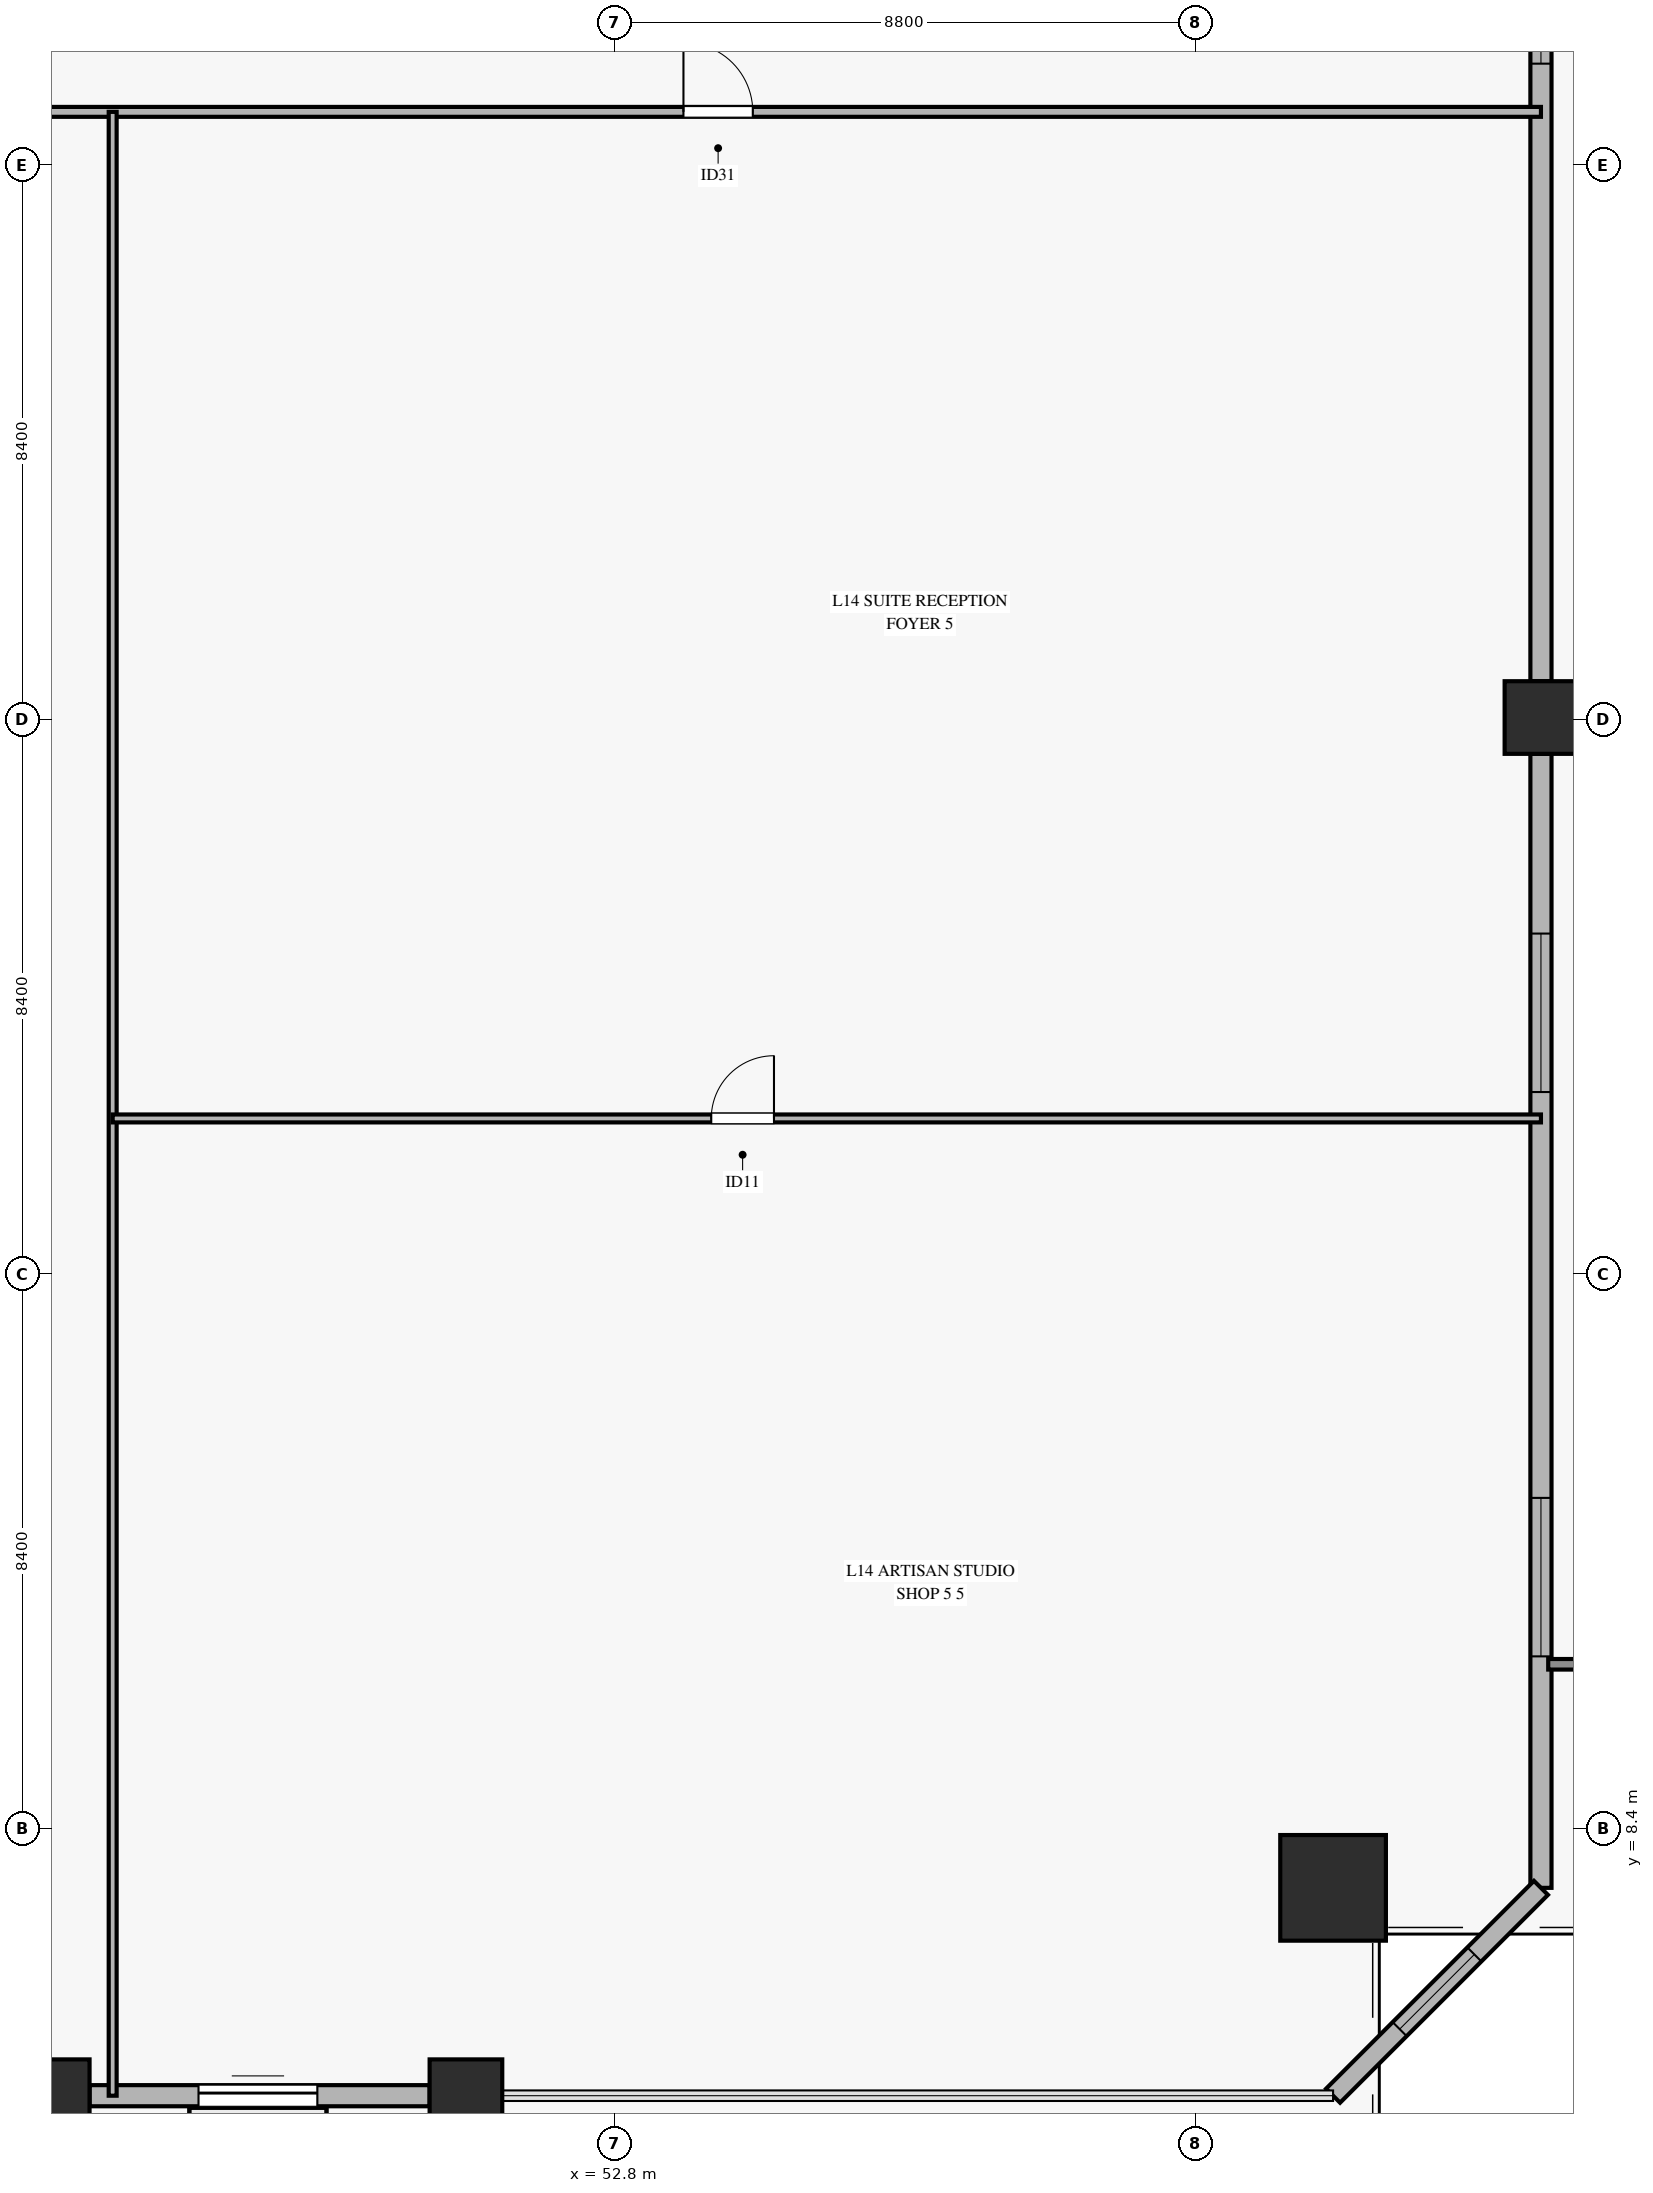
"""IFC4 building model, lengths in metres.
Left out: names, types, materials, properties, quantities, classifications, styles, units other than length and angle.
Written with IfcOpenShell. Run it as: python <this file> out.ifc"""

import sys

from ifc_helpers import new_model, si_unit, direction, frame, frame_2d, origin, origin_2d, place, context, subcontext, project, spatial, rectangle, hollow_rectangle, extrude, source, transform, mapped, element, fill, save


model = new_model("IFC4")
c1 = context("Model", 3, precision=1e-05, world=origin(), true_north=direction((0.0, 1.0)))
c2 = subcontext(c1, "Body", "Model", "MODEL_VIEW")
j1 = project(units=[si_unit("LENGTHUNIT", "METRE"), si_unit("PLANEANGLEUNIT", "RADIAN")], contexts=[c1])
p1 = place(None, origin())
s1 = spatial("IfcSite", under=j1, at=p1, CompositionType="ELEMENT")
p2 = place(p1, origin())
s2 = spatial("IfcBuilding", under=s1, at=p2, CompositionType="ELEMENT")
p3 = place(p2, frame((0.0, 0.0, 57.2)))
s3 = spatial("IfcBuildingStorey", under=s2, at=p3, CompositionType="ELEMENT", Elevation=57.2)
m1 = source(origin(), c2, "Body", "SweptSolid", [
    extrude(hollow_rectangle(XDim=1.6, YDim=1.6, WallThickness=0.075, at=origin_2d()), origin(), (0.0, 0.0, 1.0), 3.72),
])
p4 = place(p3, frame((63.682, 7.502, 0.0), z_axis=(-0.055853235293, 0.134940366349, 0.98927827917), x_axis=(-0.923978502811, -0.382444409481, 0.0)))
e1 = element("IfcColumn", 1, at=p4, inside=s3, PredefinedType="COLUMN", context=c2, shape_type="MappedRepresentation", body=[
    mapped(m1, transform((0.0, 0.0, 0.0), x_axis=(1.0, 0.0, 0.0), y_axis=(0.0, 1.0, 0.0), z_axis=(0.0, 0.0, 1.0), scale=1.0)),
])
m2 = source(origin(), c2, "Body", "SweptSolid", [
    extrude(hollow_rectangle(XDim=1.1, YDim=1.1, WallThickness=0.05, at=origin_2d()), origin(), (0.0, 0.0, 1.0), 3.718),
])
for number, where, z_axis, x_axis in (
    (2, (44.3, 4.354, 0.0), (0.0, 0.142, 0.99), (-1.0, 0.0, 0.0)),
    (3, (50.55, 4.354, 0.0), (0.0, 0.142, 0.99), (-1.0, 0.0, 0.0)),
):
    element("IfcColumn", number, at=place(p3, frame(where, z_axis=z_axis, x_axis=x_axis)), inside=s3, PredefinedType="COLUMN", context=c2, shape_type="MappedRepresentation", body=[
        mapped(m2, transform((0.0, 0.0, 0.0), x_axis=(1.0, 0.0, 0.0), y_axis=(0.0, 1.0, 0.0), z_axis=(0.0, 0.0, 1.0), scale=1.0)),
    ])
m3 = source(origin(), c2, "Body", "SweptSolid", [
    extrude(hollow_rectangle(XDim=1.1, YDim=1.1, WallThickness=0.05, at=origin_2d()), origin(), (0.0, 0.0, 1.0), 3.697),
])
p5 = place(p3, frame((66.83, 25.227, 0.0), z_axis=(-0.063333303059, 0.071390303031, 0.995435742455), x_axis=(-0.7480580155, -0.6636333366, 0.0)))
e4 = element("IfcColumn", 4, at=p5, inside=s3, PredefinedType="COLUMN", context=c2, shape_type="MappedRepresentation", body=[
    mapped(m3, transform((0.0, 0.0, 0.0), x_axis=(1.0, 0.0, 0.0), y_axis=(0.0, 1.0, 0.0), z_axis=(0.0, 0.0, 1.0), scale=1.0)),
])
p6 = place(p3, frame((44.85, 4.354, 0.0), z_axis=(0.0, 0.0, 1.0), x_axis=(1.0, 0.0, 0.0)))
e5 = element("IfcWall", 5, at=p6, inside=s3, PredefinedType="SOLIDWALL", context=c2, shape_type="SweptSolid", body=[
    extrude(rectangle(XDim=5.15, YDim=0.32, at=frame_2d((2.575, 0.0))), origin(), (0.0, 0.0, 1.0), 3.16),
])
p7 = place(p6, frame((1.65, 0.0, 0.0)))
e6 = element("IfcOpeningElement", 6, at=p7, cuts=e5, PredefinedType="OPENING", context=c2, shape_type="SweptSolid", body=[
    extrude(rectangle(XDim=1.8, YDim=2.25, at=frame_2d((0.9, 1.125))), frame((0.0, 0.17, 0.0), z_axis=(0.0, -1.0, 0.0), x_axis=(1.0, 0.0, 0.0)), (0.0, 0.0, 1.0), 0.34),
])
p8 = place(p3, frame((66.83, 7.502, 0.0), z_axis=(0.0, 0.0, 1.0), x_axis=(0.0, 1.0, 0.0)))
e7 = element("IfcWall", 7, at=p8, inside=s3, PredefinedType="SOLIDWALL", context=c2, shape_type="SweptSolid", body=[
    extrude(rectangle(XDim=17.175, YDim=0.32, at=frame_2d((8.587, 0.0))), origin(), (0.0, 0.0, 1.0), 3.16),
])
p9 = place(p8, frame((3.506, 0.0, 0.45)))
e8 = element("IfcOpeningElement", 8, at=p9, cuts=e7, PredefinedType="OPENING", context=c2, shape_type="SweptSolid", body=[
    extrude(rectangle(XDim=2.4, YDim=2.1, at=frame_2d((1.2, 1.05))), frame((0.0, 0.17, 0.0), z_axis=(0.0, -1.0, 0.0), x_axis=(1.0, 0.0, 0.0)), (0.0, 0.0, 1.0), 0.34),
])
p10 = place(p8, frame((12.053, 0.0, 0.45)))
e9 = element("IfcOpeningElement", 9, at=p10, cuts=e7, PredefinedType="OPENING", context=c2, shape_type="SweptSolid", body=[
    extrude(rectangle(XDim=2.4, YDim=2.1, at=frame_2d((1.2, 1.05))), frame((0.0, 0.17, 0.0), z_axis=(0.0, -1.0, 0.0), x_axis=(1.0, 0.0, 0.0)), (0.0, 0.0, 1.0), 0.34),
])
p11 = place(p3, frame((66.83, 25.777, 0.0), z_axis=(0.0, 0.0, 1.0), x_axis=(0.0, 1.0, 0.0)))
e10 = element("IfcWall", 10, at=p11, inside=s3, PredefinedType="SOLIDWALL", context=c2, shape_type="SweptSolid", body=[
    extrude(rectangle(XDim=17.175, YDim=0.32, at=frame_2d((8.587, 0.0))), origin(), (0.0, 0.0, 1.0), 3.16),
])
p12 = place(p11, frame((9.353, 0.0, 0.45)))
e11 = element("IfcOpeningElement", 11, at=p12, cuts=e10, PredefinedType="OPENING", context=c2, shape_type="SweptSolid", body=[
    extrude(rectangle(XDim=1.6, YDim=2.0, at=frame_2d((0.8, 1.0))), frame((0.0, 0.17, 0.0), z_axis=(0.0, -1.0, 0.0), x_axis=(1.0, 0.0, 0.0)), (0.0, 0.0, 1.0), 0.34),
])
p13 = place(p3, frame((63.682, 4.354, 0.0), z_axis=(0.0, 0.0, 1.0), x_axis=(0.707134199585, 0.707079361725, 0.0)))
e12 = element("IfcWall", 12, at=p13, inside=s3, PredefinedType="SOLIDWALL", context=c2, shape_type="SweptSolid", body=[
    extrude(rectangle(XDim=4.452, YDim=0.3, at=frame_2d((2.226, 0.0))), origin(), (0.0, 0.0, 1.0), 3.16),
])
p14 = place(p13, frame((1.426, 0.0, 0.45)))
e13 = element("IfcOpeningElement", 13, at=p14, cuts=e12, PredefinedType="OPENING", context=c2, shape_type="SweptSolid", body=[
    extrude(rectangle(XDim=1.6, YDim=2.0, at=frame_2d((0.8, 1.0))), frame((0.0, 0.16, 0.0), z_axis=(0.0, -1.0, 0.0), x_axis=(1.0, 0.0, 0.0)), (0.0, 0.0, 1.0), 0.32),
])
p15 = place(p3, frame((3.57, 34.4, 0.0), z_axis=(0.0, 0.0, 1.0), x_axis=(1.0, 0.0, 0.0)))
e14 = element("IfcWall", 14, at=p15, inside=s3, PredefinedType="PARTITIONING", context=c2, shape_type="SweptSolid", body=[
    extrude(rectangle(XDim=63.26, YDim=0.15, at=frame_2d((31.63, 0.0))), origin(), (0.0, 0.0, 1.0), 2.765),
])
p16 = place(p15, frame((7.799, 0.0, 0.0)))
e15 = element("IfcOpeningElement", 15, at=p16, cuts=e14, PredefinedType="OPENING", context=c2, shape_type="SweptSolid", body=[
    extrude(rectangle(XDim=1.05, YDim=2.15, at=frame_2d((0.525, 1.075))), frame((0.0, 0.085, 0.0), z_axis=(0.0, -1.0, 0.0), x_axis=(1.0, 0.0, 0.0)), (0.0, 0.0, 1.0), 0.17),
])
p17 = place(p15, frame((22.121, 0.0, 0.0)))
e16 = element("IfcOpeningElement", 16, at=p17, cuts=e14, PredefinedType="OPENING", context=c2, shape_type="SweptSolid", body=[
    extrude(rectangle(XDim=1.05, YDim=2.15, at=frame_2d((0.525, 1.075))), frame((0.0, 0.085, 0.0), z_axis=(0.0, -1.0, 0.0), x_axis=(1.0, 0.0, 0.0)), (0.0, 0.0, 1.0), 0.17),
])
p18 = place(p15, frame((30.437, 0.0, 0.0)))
e17 = element("IfcOpeningElement", 17, at=p18, cuts=e14, PredefinedType="OPENING", context=c2, shape_type="SweptSolid", body=[
    extrude(rectangle(XDim=1.05, YDim=2.15, at=frame_2d((0.525, 1.075))), frame((0.0, 0.085, 0.0), z_axis=(0.0, -1.0, 0.0), x_axis=(1.0, 0.0, 0.0)), (0.0, 0.0, 1.0), 0.17),
])
p19 = place(p15, frame((37.965, 0.0, 0.0)))
e18 = element("IfcOpeningElement", 18, at=p19, cuts=e14, PredefinedType="OPENING", context=c2, shape_type="SweptSolid", body=[
    extrude(rectangle(XDim=1.05, YDim=2.15, at=frame_2d((0.525, 1.075))), frame((0.0, 0.085, 0.0), z_axis=(0.0, -1.0, 0.0), x_axis=(1.0, 0.0, 0.0)), (0.0, 0.0, 1.0), 0.17),
])
p20 = place(p15, frame((50.274, 0.0, 0.0)))
e19 = element("IfcOpeningElement", 19, at=p20, cuts=e14, PredefinedType="OPENING", context=c2, shape_type="SweptSolid", body=[
    extrude(rectangle(XDim=1.05, YDim=2.15, at=frame_2d((0.525, 1.075))), frame((0.0, 0.085, 0.0), z_axis=(0.0, -1.0, 0.0), x_axis=(1.0, 0.0, 0.0)), (0.0, 0.0, 1.0), 0.17),
])
p21 = place(p3, frame((45.2, 4.354, 0.0), z_axis=(0.0, 0.0, 1.0), x_axis=(0.0, 1.0, 0.0)))
e20 = element("IfcWall", 20, at=p21, inside=s3, PredefinedType="PARTITIONING", context=c2, shape_type="SweptSolid", body=[
    extrude(rectangle(XDim=30.046, YDim=0.12, at=frame_2d((15.023, 0.0))), origin(), (0.0, 0.0, 1.0), 3.165),
])
p22 = place(p3, frame((45.2, 19.155, 0.0), z_axis=(0.0, 0.0, 1.0), x_axis=(1.0, 0.0, 0.0)))
e21 = element("IfcWall", 21, at=p22, inside=s3, PredefinedType="PARTITIONING", context=c2, shape_type="SweptSolid", body=[
    extrude(rectangle(XDim=21.63, YDim=0.12, at=frame_2d((10.815, 0.0))), origin(), (0.0, 0.0, 1.0), 2.765),
])
p23 = place(p22, frame((9.065, 0.0, 0.0)))
e22 = element("IfcOpeningElement", 22, at=p23, cuts=e21, PredefinedType="OPENING", context=c2, shape_type="SweptSolid", body=[
    extrude(rectangle(XDim=0.95, YDim=2.1, at=frame_2d((0.475, 1.05))), frame((0.0, 0.07, 0.0), z_axis=(0.0, -1.0, 0.0), x_axis=(1.0, 0.0, 0.0)), (0.0, 0.0, 1.0), 0.14),
])
m4 = source(origin(), c2, "Body", "SweptSolid", [
    extrude(rectangle(XDim=1.8, YDim=2.25, at=frame_2d((0.9, 1.125))), frame((0.0, 0.025, 0.0), z_axis=(0.0, -1.0, 0.0), x_axis=(1.0, 0.0, 0.0)), (0.0, 0.0, 1.0), 0.05),
])
p24 = place(p7, origin())
e23 = element("IfcDoor", 23, at=p24, inside=s3, OperationType="SLIDING_TO_LEFT", PredefinedType="DOOR", context=c2, shape_type="MappedRepresentation", body=[
    mapped(m4, transform((0.0, 0.0, 0.0), x_axis=(1.0, 0.0, 0.0), y_axis=(0.0, 1.0, 0.0), z_axis=(0.0, 0.0, 1.0), scale=1.0)),
])
fill(e6, e23)
m5 = source(origin(), c2, "Body", "SweptSolid", [
    extrude(rectangle(XDim=2.4, YDim=2.1, at=frame_2d((1.2, 1.05))), frame((0.0, 0.03, 0.0), z_axis=(0.0, -1.0, 0.0), x_axis=(1.0, 0.0, 0.0)), (0.0, 0.0, 1.0), 0.06),
])
p25 = place(p9, origin())
e24 = element("IfcWindow", 24, at=p25, inside=s3, PartitioningType="SINGLE_PANEL", PredefinedType="WINDOW", context=c2, shape_type="MappedRepresentation", body=[
    mapped(m5, transform((0.0, 0.0, 0.0), x_axis=(1.0, 0.0, 0.0), y_axis=(0.0, 1.0, 0.0), z_axis=(0.0, 0.0, 1.0), scale=1.0)),
])
fill(e8, e24)
p26 = place(p10, origin())
e25 = element("IfcWindow", 25, at=p26, inside=s3, PartitioningType="SINGLE_PANEL", PredefinedType="WINDOW", context=c2, shape_type="MappedRepresentation", body=[
    mapped(m5, transform((0.0, 0.0, 0.0), x_axis=(1.0, 0.0, 0.0), y_axis=(0.0, 1.0, 0.0), z_axis=(0.0, 0.0, 1.0), scale=1.0)),
])
fill(e9, e25)
m6 = source(origin(), c2, "Body", "SweptSolid", [
    extrude(rectangle(XDim=1.6, YDim=2.0, at=frame_2d((0.8, 1.0))), frame((0.0, 0.03, 0.0), z_axis=(0.0, -1.0, 0.0), x_axis=(1.0, 0.0, 0.0)), (0.0, 0.0, 1.0), 0.06),
])
p27 = place(p12, origin())
e26 = element("IfcWindow", 26, at=p27, inside=s3, PartitioningType="SINGLE_PANEL", PredefinedType="WINDOW", context=c2, shape_type="MappedRepresentation", body=[
    mapped(m6, transform((0.0, 0.0, 0.0), x_axis=(1.0, 0.0, 0.0), y_axis=(0.0, 1.0, 0.0), z_axis=(0.0, 0.0, 1.0), scale=1.0)),
])
fill(e11, e26)
p28 = place(p14, origin())
e27 = element("IfcWindow", 27, at=p28, inside=s3, PartitioningType="SINGLE_PANEL", PredefinedType="WINDOW", context=c2, shape_type="MappedRepresentation", body=[
    mapped(m6, transform((0.0, 0.0, 0.0), x_axis=(1.0, 0.0, 0.0), y_axis=(0.0, 1.0, 0.0), z_axis=(0.0, 0.0, 1.0), scale=1.0)),
])
fill(e13, e27)
m7 = source(origin(), c2, "Body", "SweptSolid", [
    extrude(rectangle(XDim=1.05, YDim=2.15, at=frame_2d((0.525, 1.075))), frame((0.0, 0.025, 0.0), z_axis=(0.0, -1.0, 0.0), x_axis=(1.0, 0.0, 0.0)), (0.0, 0.0, 1.0), 0.05),
])
p29 = place(p20, origin())
e28 = element("IfcDoor", 28, at=p29, inside=s3, OperationType="SINGLE_SWING_LEFT", PredefinedType="DOOR", context=c2, shape_type="MappedRepresentation", body=[
    mapped(m7, transform((0.0, 0.0, 0.0), x_axis=(1.0, 0.0, 0.0), y_axis=(0.0, 1.0, 0.0), z_axis=(0.0, 0.0, 1.0), scale=1.0)),
])
fill(e19, e28)
m8 = source(origin(), c2, "Body", "SweptSolid", [
    extrude(rectangle(XDim=0.95, YDim=2.1, at=frame_2d((0.475, 1.05))), frame((0.0, 0.025, 0.0), z_axis=(0.0, -1.0, 0.0), x_axis=(1.0, 0.0, 0.0)), (0.0, 0.0, 1.0), 0.05),
])
p30 = place(p23, origin())
e29 = element("IfcDoor", 29, at=p30, inside=s3, OperationType="SINGLE_SWING_RIGHT", PredefinedType="DOOR", context=c2, shape_type="MappedRepresentation", body=[
    mapped(m8, transform((0.0, 0.0, 0.0), x_axis=(1.0, 0.0, 0.0), y_axis=(0.0, 1.0, 0.0), z_axis=(0.0, 0.0, 1.0), scale=1.0)),
])
fill(e22, e29)
save(model, sys.argv[1])
